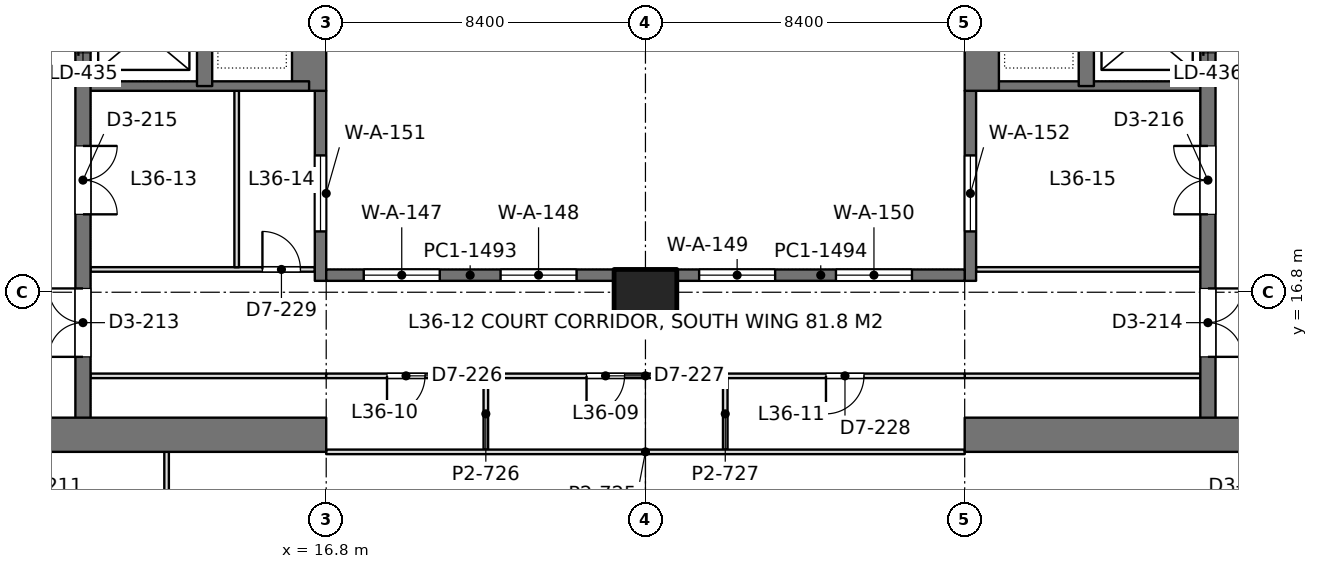
"""IFC4 building model, lengths in metres.
Left out: names, types, materials, properties, quantities, classifications, styles, units other than length and angle.
Written with IfcOpenShell. Run it as: python <this file> out.ifc"""

import sys

from ifc_helpers import new_model, si_unit, direction, frame, frame_2d, origin, origin_2d, place, context, subcontext, project, spatial, rectangle, extrude, element, fill, save


model = new_model("IFC4")
c1 = context("Model", 3, precision=1e-05, world=origin(), true_north=direction((0.0, 1.0)))
c2 = subcontext(c1, "Body", "Model", "MODEL_VIEW")
j1 = project(units=[si_unit("LENGTHUNIT", "METRE"), si_unit("PLANEANGLEUNIT", "RADIAN")], contexts=[c1])
p1 = place(None, origin())
s1 = spatial("IfcSite", under=j1, at=p1, CompositionType="ELEMENT")
p2 = place(p1, origin())
s2 = spatial("IfcBuilding", under=s1, at=p2, CompositionType="ELEMENT")
p3 = place(p2, frame((0.0, 0.0, 159.6)))
s3 = spatial("IfcBuildingStorey", under=s2, at=p3, CompositionType="ELEMENT", Elevation=159.6)
p4 = place(p3, frame((25.2, 16.8, 0.0), z_axis=(0.0, 0.0, 1.0), x_axis=(1.0, 0.0, 0.0)))
e1 = element("IfcColumn", 1, at=p4, inside=s3, PredefinedType="COLUMN", context=c2, shape_type="SweptSolid", body=[
    extrude(rectangle(XDim=1.65, YDim=1.2, at=origin_2d()), origin(), (0.0, 0.0, 1.0), 4.2),
])
p5 = place(p3, frame((-1.2, 13.05, 0.0), z_axis=(0.0, 0.0, 1.0), x_axis=(1.0, 0.0, 0.0)))
e2 = element("IfcWall", 2, at=p5, inside=s3, PredefinedType="SHEAR", context=c2, shape_type="SweptSolid", body=[
    extrude(rectangle(XDim=18.0, YDim=0.9, at=frame_2d((9.0, 0.0))), origin(), (0.0, 0.0, 1.0), 4.2),
])
p6 = place(p5, frame((8.95, 0.0, 0.0)))
e3 = element("IfcOpeningElement", 3, at=p6, cuts=e2, PredefinedType="OPENING", context=c2, shape_type="SweptSolid", body=[
    extrude(rectangle(XDim=1.8, YDim=2.4, at=frame_2d((0.9, 1.2))), frame((0.0, 0.46, 0.0), z_axis=(0.0, -1.0, 0.0), x_axis=(1.0, 0.0, 0.0)), (0.0, 0.0, 1.0), 0.92),
])
p7 = place(p3, frame((16.35, 22.1, 0.0), z_axis=(0.0, 0.0, 1.0), x_axis=(0.0, 1.0, 0.0)))
e4 = element("IfcWall", 4, at=p7, inside=s3, PredefinedType="SHEAR", context=c2, shape_type="SweptSolid", body=[
    extrude(rectangle(XDim=15.25, YDim=0.9, at=frame_2d((7.625, 0.0))), origin(), (0.0, 0.0, 1.0), 4.2),
])
p8 = place(p3, frame((10.4, 13.05, 0.0), z_axis=(0.0, 0.0, 1.0), x_axis=(0.0, 1.0, 0.0)))
e5 = element("IfcWall", 5, at=p8, inside=s3, PredefinedType="SHEAR", context=c2, shape_type="SweptSolid", body=[
    extrude(rectangle(XDim=24.3, YDim=0.4, at=frame_2d((12.15, 0.0))), origin(), (0.0, 0.0, 1.0), 4.2),
])
p9 = place(p8, frame((10.05, 0.0, 0.0)))
e6 = element("IfcOpeningElement", 6, at=p9, cuts=e5, PredefinedType="OPENING", context=c2, shape_type="SweptSolid", body=[
    extrude(rectangle(XDim=1.1, YDim=2.2, at=frame_2d((0.55, 1.1))), frame((0.0, 0.21, 0.0), z_axis=(0.0, -1.0, 0.0), x_axis=(1.0, 0.0, 0.0)), (0.0, 0.0, 1.0), 0.42),
])
p10 = place(p8, frame((12.9, 0.0, 0.0)))
e7 = element("IfcOpeningElement", 7, at=p10, cuts=e5, PredefinedType="OPENING", context=c2, shape_type="SweptSolid", body=[
    extrude(rectangle(XDim=1.1, YDim=2.2, at=frame_2d((0.55, 1.1))), frame((0.0, 0.21, 0.0), z_axis=(0.0, -1.0, 0.0), x_axis=(1.0, 0.0, 0.0)), (0.0, 0.0, 1.0), 0.42),
])
p11 = place(p8, frame((21.45, 0.0, 0.0)))
e8 = element("IfcOpeningElement", 8, at=p11, cuts=e5, PredefinedType="OPENING", context=c2, shape_type="SweptSolid", body=[
    extrude(rectangle(XDim=1.1, YDim=2.2, at=frame_2d((0.55, 1.1))), frame((0.0, 0.21, 0.0), z_axis=(0.0, -1.0, 0.0), x_axis=(1.0, 0.0, 0.0)), (0.0, 0.0, 1.0), 0.42),
])
p12 = place(p8, frame((2.05, 0.0, 0.0)))
e9 = element("IfcOpeningElement", 9, at=p12, cuts=e5, PredefinedType="OPENING", context=c2, shape_type="SweptSolid", body=[
    extrude(rectangle(XDim=1.8, YDim=2.4, at=frame_2d((0.9, 1.2))), frame((0.0, 0.21, 0.0), z_axis=(0.0, -1.0, 0.0), x_axis=(1.0, 0.0, 0.0)), (0.0, 0.0, 1.0), 0.42),
])
p13 = place(p8, frame((5.8, 0.0, 0.0)))
e10 = element("IfcOpeningElement", 10, at=p13, cuts=e5, PredefinedType="OPENING", context=c2, shape_type="SweptSolid", body=[
    extrude(rectangle(XDim=1.8, YDim=2.4, at=frame_2d((0.9, 1.2))), frame((0.0, 0.21, 0.0), z_axis=(0.0, -1.0, 0.0), x_axis=(1.0, 0.0, 0.0)), (0.0, 0.0, 1.0), 0.42),
])
p14 = place(p3, frame((13.6, 22.225, 0.0), z_axis=(0.0, 0.0, 1.0), x_axis=(0.0, 1.0, 0.0)))
e11 = element("IfcWall", 11, at=p14, inside=s3, PredefinedType="SHEAR", context=c2, shape_type="SweptSolid", body=[
    extrude(rectangle(XDim=15.125, YDim=0.4, at=frame_2d((7.562, 0.0))), origin(), (0.0, 0.0, 1.0), 4.2),
])
p15 = place(p3, frame((10.4, 22.225, 0.0), z_axis=(0.0, 0.0, 1.0), x_axis=(1.0, 0.0, 0.0)))
e12 = element("IfcWall", 12, at=p15, inside=s3, PredefinedType="SHEAR", context=c2, shape_type="SweptSolid", body=[
    extrude(rectangle(XDim=5.95, YDim=0.25, at=frame_2d((2.975, 0.0))), origin(), (0.0, 0.0, 1.0), 4.2),
])
p16 = place(p3, frame((33.6, 13.05, 0.0), z_axis=(0.0, 0.0, 1.0), x_axis=(1.0, 0.0, 0.0)))
e13 = element("IfcWall", 13, at=p16, inside=s3, PredefinedType="SHEAR", context=c2, shape_type="SweptSolid", body=[
    extrude(rectangle(XDim=18.0, YDim=0.9, at=frame_2d((9.0, 0.0))), origin(), (0.0, 0.0, 1.0), 4.2),
])
p17 = place(p16, frame((7.25, 0.0, 0.0)))
e14 = element("IfcOpeningElement", 14, at=p17, cuts=e13, PredefinedType="OPENING", context=c2, shape_type="SweptSolid", body=[
    extrude(rectangle(XDim=1.8, YDim=2.4, at=frame_2d((0.9, 1.2))), frame((0.0, 0.46, 0.0), z_axis=(0.0, -1.0, 0.0), x_axis=(1.0, 0.0, 0.0)), (0.0, 0.0, 1.0), 0.92),
])
p18 = place(p3, frame((34.05, 22.1, 0.0), z_axis=(0.0, 0.0, 1.0), x_axis=(0.0, 1.0, 0.0)))
e15 = element("IfcWall", 15, at=p18, inside=s3, PredefinedType="SHEAR", context=c2, shape_type="SweptSolid", body=[
    extrude(rectangle(XDim=15.25, YDim=0.9, at=frame_2d((7.625, 0.0))), origin(), (0.0, 0.0, 1.0), 4.2),
])
p19 = place(p3, frame((40.0, 13.05, 0.0), z_axis=(0.0, 0.0, 1.0), x_axis=(0.0, 1.0, 0.0)))
e16 = element("IfcWall", 16, at=p19, inside=s3, PredefinedType="SHEAR", context=c2, shape_type="SweptSolid", body=[
    extrude(rectangle(XDim=24.3, YDim=0.4, at=frame_2d((12.15, 0.0))), origin(), (0.0, 0.0, 1.0), 4.2),
])
p20 = place(p19, frame((10.05, 0.0, 0.0)))
e17 = element("IfcOpeningElement", 17, at=p20, cuts=e16, PredefinedType="OPENING", context=c2, shape_type="SweptSolid", body=[
    extrude(rectangle(XDim=1.1, YDim=2.2, at=frame_2d((0.55, 1.1))), frame((0.0, 0.21, 0.0), z_axis=(0.0, -1.0, 0.0), x_axis=(1.0, 0.0, 0.0)), (0.0, 0.0, 1.0), 0.42),
])
p21 = place(p19, frame((12.9, 0.0, 0.0)))
e18 = element("IfcOpeningElement", 18, at=p21, cuts=e16, PredefinedType="OPENING", context=c2, shape_type="SweptSolid", body=[
    extrude(rectangle(XDim=1.1, YDim=2.2, at=frame_2d((0.55, 1.1))), frame((0.0, 0.21, 0.0), z_axis=(0.0, -1.0, 0.0), x_axis=(1.0, 0.0, 0.0)), (0.0, 0.0, 1.0), 0.42),
])
p22 = place(p19, frame((21.45, 0.0, 0.0)))
e19 = element("IfcOpeningElement", 19, at=p22, cuts=e16, PredefinedType="OPENING", context=c2, shape_type="SweptSolid", body=[
    extrude(rectangle(XDim=1.1, YDim=2.2, at=frame_2d((0.55, 1.1))), frame((0.0, 0.21, 0.0), z_axis=(0.0, -1.0, 0.0), x_axis=(1.0, 0.0, 0.0)), (0.0, 0.0, 1.0), 0.42),
])
p23 = place(p19, frame((2.05, 0.0, 0.0)))
e20 = element("IfcOpeningElement", 20, at=p23, cuts=e16, PredefinedType="OPENING", context=c2, shape_type="SweptSolid", body=[
    extrude(rectangle(XDim=1.8, YDim=2.4, at=frame_2d((0.9, 1.2))), frame((0.0, 0.21, 0.0), z_axis=(0.0, -1.0, 0.0), x_axis=(1.0, 0.0, 0.0)), (0.0, 0.0, 1.0), 0.42),
])
p24 = place(p19, frame((5.8, 0.0, 0.0)))
e21 = element("IfcOpeningElement", 21, at=p24, cuts=e16, PredefinedType="OPENING", context=c2, shape_type="SweptSolid", body=[
    extrude(rectangle(XDim=1.8, YDim=2.4, at=frame_2d((0.9, 1.2))), frame((0.0, 0.21, 0.0), z_axis=(0.0, -1.0, 0.0), x_axis=(1.0, 0.0, 0.0)), (0.0, 0.0, 1.0), 0.42),
])
p25 = place(p3, frame((36.8, 22.225, 0.0), z_axis=(0.0, 0.0, 1.0), x_axis=(0.0, 1.0, 0.0)))
e22 = element("IfcWall", 22, at=p25, inside=s3, PredefinedType="SHEAR", context=c2, shape_type="SweptSolid", body=[
    extrude(rectangle(XDim=15.125, YDim=0.4, at=frame_2d((7.562, 0.0))), origin(), (0.0, 0.0, 1.0), 4.2),
])
p26 = place(p3, frame((40.0, 22.225, 0.0), z_axis=(0.0, 0.0, 1.0), x_axis=(-1.0, 0.0, 0.0)))
e23 = element("IfcWall", 23, at=p26, inside=s3, PredefinedType="SHEAR", context=c2, shape_type="SweptSolid", body=[
    extrude(rectangle(XDim=5.95, YDim=0.25, at=frame_2d((2.975, 0.0))), origin(), (0.0, 0.0, 1.0), 4.2),
])
p27 = place(p3, frame((16.65, 17.1, 0.0), z_axis=(0.0, 0.0, 1.0), x_axis=(0.0, 1.0, 0.0)))
e24 = element("IfcWall", 24, at=p27, inside=s3, PredefinedType="SOLIDWALL", context=c2, shape_type="SweptSolid", body=[
    extrude(rectangle(XDim=5.0, YDim=0.3, at=frame_2d((2.5, 0.0))), origin(), (0.0, 0.0, 1.0), 4.05),
])
p28 = place(p27, frame((1.3, 0.0, 0.1)))
e25 = element("IfcOpeningElement", 25, at=p28, cuts=e24, PredefinedType="OPENING", context=c2, shape_type="SweptSolid", body=[
    extrude(rectangle(XDim=2.0, YDim=3.0, at=frame_2d((1.0, 1.5))), frame((0.0, 0.16, 0.0), z_axis=(0.0, -1.0, 0.0), x_axis=(1.0, 0.0, 0.0)), (0.0, 0.0, 1.0), 0.32),
])
p29 = place(p3, frame((33.75, 17.1, 0.0), z_axis=(0.0, 0.0, 1.0), x_axis=(0.0, 1.0, 0.0)))
e26 = element("IfcWall", 26, at=p29, inside=s3, PredefinedType="SOLIDWALL", context=c2, shape_type="SweptSolid", body=[
    extrude(rectangle(XDim=5.0, YDim=0.3, at=frame_2d((2.5, 0.0))), origin(), (0.0, 0.0, 1.0), 4.05),
])
p30 = place(p29, frame((1.3, 0.0, 0.1)))
e27 = element("IfcOpeningElement", 27, at=p30, cuts=e26, PredefinedType="OPENING", context=c2, shape_type="SweptSolid", body=[
    extrude(rectangle(XDim=2.0, YDim=3.0, at=frame_2d((1.0, 1.5))), frame((0.0, 0.16, 0.0), z_axis=(0.0, -1.0, 0.0), x_axis=(1.0, 0.0, 0.0)), (0.0, 0.0, 1.0), 0.32),
])
p31 = place(p3, frame((16.8, 17.25, 0.0), z_axis=(0.0, 0.0, 1.0), x_axis=(1.0, 0.0, 0.0)))
e28 = element("IfcWall", 28, at=p31, inside=s3, PredefinedType="SOLIDWALL", context=c2, shape_type="SweptSolid", body=[
    extrude(rectangle(XDim=7.575, YDim=0.3, at=frame_2d((3.788, 0.0))), origin(), (0.0, 0.0, 1.0), 4.05),
])
p32 = place(p31, frame((0.988, 0.0, 0.1)))
e29 = element("IfcOpeningElement", 29, at=p32, cuts=e28, PredefinedType="OPENING", context=c2, shape_type="SweptSolid", body=[
    extrude(rectangle(XDim=2.0, YDim=3.0, at=frame_2d((1.0, 1.5))), frame((0.0, 0.16, 0.0), z_axis=(0.0, -1.0, 0.0), x_axis=(1.0, 0.0, 0.0)), (0.0, 0.0, 1.0), 0.32),
])
p33 = place(p31, frame((4.587, 0.0, 0.1)))
e30 = element("IfcOpeningElement", 30, at=p33, cuts=e28, PredefinedType="OPENING", context=c2, shape_type="SweptSolid", body=[
    extrude(rectangle(XDim=2.0, YDim=3.0, at=frame_2d((1.0, 1.5))), frame((0.0, 0.16, 0.0), z_axis=(0.0, -1.0, 0.0), x_axis=(1.0, 0.0, 0.0)), (0.0, 0.0, 1.0), 0.32),
])
p34 = place(p3, frame((26.025, 17.25, 0.0), z_axis=(0.0, 0.0, 1.0), x_axis=(1.0, 0.0, 0.0)))
e31 = element("IfcWall", 31, at=p34, inside=s3, PredefinedType="SOLIDWALL", context=c2, shape_type="SweptSolid", body=[
    extrude(rectangle(XDim=7.575, YDim=0.3, at=frame_2d((3.788, 0.0))), origin(), (0.0, 0.0, 1.0), 4.05),
])
p35 = place(p34, frame((0.587, 0.0, 0.1)))
e32 = element("IfcOpeningElement", 32, at=p35, cuts=e31, PredefinedType="OPENING", context=c2, shape_type="SweptSolid", body=[
    extrude(rectangle(XDim=2.0, YDim=3.0, at=frame_2d((1.0, 1.5))), frame((0.0, 0.16, 0.0), z_axis=(0.0, -1.0, 0.0), x_axis=(1.0, 0.0, 0.0)), (0.0, 0.0, 1.0), 0.32),
])
p36 = place(p34, frame((4.188, 0.0, 0.1)))
e33 = element("IfcOpeningElement", 33, at=p36, cuts=e31, PredefinedType="OPENING", context=c2, shape_type="SweptSolid", body=[
    extrude(rectangle(XDim=2.0, YDim=3.0, at=frame_2d((1.0, 1.5))), frame((0.0, 0.16, 0.0), z_axis=(0.0, -1.0, 0.0), x_axis=(1.0, 0.0, 0.0)), (0.0, 0.0, 1.0), 0.32),
])
p37 = place(p3, frame((10.598, 17.4, 0.0), z_axis=(0.0, 0.0, 1.0), x_axis=(1.0, 0.0, 0.0)))
e34 = element("IfcWall", 34, at=p37, inside=s3, PredefinedType="PARTITIONING", context=c2, shape_type="SweptSolid", body=[
    extrude(rectangle(XDim=5.904, YDim=0.12, at=frame_2d((2.952, 0.0))), origin(), (0.0, 0.0, 1.0), 3.55),
])
p38 = place(p37, frame((4.524, 0.0, 0.0)))
e35 = element("IfcOpeningElement", 35, at=p38, cuts=e34, PredefinedType="OPENING", context=c2, shape_type="SweptSolid", body=[
    extrude(rectangle(XDim=1.0, YDim=2.4, at=frame_2d((0.5, 1.2))), frame((0.0, 0.07, 0.0), z_axis=(0.0, -1.0, 0.0), x_axis=(1.0, 0.0, 0.0)), (0.0, 0.0, 1.0), 0.14),
])
p39 = place(p3, frame((14.444, 17.458, 0.0), z_axis=(0.0, 0.0, 1.0), x_axis=(0.0, 1.0, 0.0)))
e36 = element("IfcWall", 36, at=p39, inside=s3, PredefinedType="PARTITIONING", context=c2, shape_type="SweptSolid", body=[
    extrude(rectangle(XDim=4.644, YDim=0.12, at=frame_2d((2.322, 0.0))), origin(), (0.0, 0.0, 1.0), 3.6),
])
p40 = place(p3, frame((33.898, 17.4, 0.0), z_axis=(0.0, 0.0, 1.0), x_axis=(1.0, 0.0, 0.0)))
e37 = element("IfcWall", 37, at=p40, inside=s3, PredefinedType="PARTITIONING", context=c2, shape_type="SweptSolid", body=[
    extrude(rectangle(XDim=5.904, YDim=0.12, at=frame_2d((2.952, 0.0))), origin(), (0.0, 0.0, 1.0), 3.55),
])
p41 = place(p3, frame((12.6, 1.898, 0.0), z_axis=(0.0, 0.0, 1.0), x_axis=(0.0, 1.0, 0.0)))
e38 = element("IfcWall", 38, at=p41, inside=s3, PredefinedType="PARTITIONING", context=c2, shape_type="SweptSolid", body=[
    extrude(rectangle(XDim=10.704, YDim=0.12, at=frame_2d((5.352, 0.0))), origin(), (0.0, 0.0, 1.0), 3.55),
])
for number, where, z_axis, x_axis in (
    (39, (10.598, 14.6, 0.0), (0.0, 0.0, 1.0), (1.0, 0.0, 0.0)),
    (40, (33.598, 14.6, 0.0), (0.0, 0.0, 1.0), (1.0, 0.0, 0.0)),
):
    element("IfcWall", number, at=place(p3, frame(where, z_axis=z_axis, x_axis=x_axis)), inside=s3, PredefinedType="PARTITIONING", context=c2, shape_type="SweptSolid", body=[
        extrude(rectangle(XDim=6.204, YDim=0.12, at=frame_2d((3.102, 0.0))), origin(), (0.0, 0.0, 1.0), 3.55),
    ])
for number, where, z_axis, x_axis in (
    (41, (21.0, 12.658, 0.0), (0.0, 0.0, 1.0), (0.0, 1.0, 0.0)),
    (42, (27.3, 12.658, 0.0), (0.0, 0.0, 1.0), (0.0, 1.0, 0.0)),
):
    element("IfcWall", number, at=place(p3, frame(where, z_axis=z_axis, x_axis=x_axis)), inside=s3, PredefinedType="PARTITIONING", context=c2, shape_type="SweptSolid", body=[
        extrude(rectangle(XDim=1.884, YDim=0.12, at=frame_2d((0.942, 0.0))), origin(), (0.0, 0.0, 1.0), 4.05),
    ])
p42 = place(p3, frame((16.798, 14.6, 0.0), z_axis=(0.0, 0.0, 1.0), x_axis=(1.0, 0.0, 0.0)))
e43 = element("IfcWall", 43, at=p42, inside=s3, PredefinedType="PARTITIONING", context=c2, shape_type="SweptSolid", body=[
    extrude(rectangle(XDim=16.804, YDim=0.12, at=frame_2d((8.402, 0.0))), origin(), (0.0, 0.0, 1.0), 3.55),
])
p43 = place(p42, frame((1.602, 0.0, 0.0)))
e44 = element("IfcOpeningElement", 44, at=p43, cuts=e43, PredefinedType="OPENING", context=c2, shape_type="SweptSolid", body=[
    extrude(rectangle(XDim=1.0, YDim=2.4, at=frame_2d((0.5, 1.2))), frame((0.0, 0.07, 0.0), z_axis=(0.0, -1.0, 0.0), x_axis=(1.0, 0.0, 0.0)), (0.0, 0.0, 1.0), 0.14),
])
p44 = place(p42, frame((6.852, 0.0, 0.0)))
e45 = element("IfcOpeningElement", 45, at=p44, cuts=e43, PredefinedType="OPENING", context=c2, shape_type="SweptSolid", body=[
    extrude(rectangle(XDim=1.0, YDim=2.4, at=frame_2d((0.5, 1.2))), frame((0.0, 0.07, 0.0), z_axis=(0.0, -1.0, 0.0), x_axis=(1.0, 0.0, 0.0)), (0.0, 0.0, 1.0), 0.14),
])
p45 = place(p42, frame((13.152, 0.0, 0.0)))
e46 = element("IfcOpeningElement", 46, at=p45, cuts=e43, PredefinedType="OPENING", context=c2, shape_type="SweptSolid", body=[
    extrude(rectangle(XDim=1.0, YDim=2.4, at=frame_2d((0.5, 1.2))), frame((0.0, 0.07, 0.0), z_axis=(0.0, -1.0, 0.0), x_axis=(1.0, 0.0, 0.0)), (0.0, 0.0, 1.0), 0.14),
])
p46 = place(p3, frame((16.8, 12.6, 0.0), z_axis=(0.0, 0.0, 1.0), x_axis=(1.0, 0.0, 0.0)))
e47 = element("IfcWall", 47, at=p46, inside=s3, PredefinedType="PARTITIONING", context=c2, shape_type="SweptSolid", body=[
    extrude(rectangle(XDim=16.8, YDim=0.12, at=frame_2d((8.4, 0.0))), origin(), (0.0, 0.0, 1.0), 3.55),
])
p47 = place(p28, origin())
e48 = element("IfcWindow", 48, at=p47, inside=s3, PartitioningType="SINGLE_PANEL", PredefinedType="WINDOW", context=c2, shape_type="SweptSolid", body=[
    extrude(rectangle(XDim=2.0, YDim=3.0, at=frame_2d((1.0, 1.5))), frame((0.0, 0.03, 0.0), z_axis=(0.0, -1.0, 0.0), x_axis=(1.0, 0.0, 0.0)), (0.0, 0.0, 1.0), 0.06),
])
fill(e25, e48)
p48 = place(p30, origin())
e49 = element("IfcWindow", 49, at=p48, inside=s3, PartitioningType="SINGLE_PANEL", PredefinedType="WINDOW", context=c2, shape_type="SweptSolid", body=[
    extrude(rectangle(XDim=2.0, YDim=3.0, at=frame_2d((1.0, 1.5))), frame((0.0, 0.03, 0.0), z_axis=(0.0, -1.0, 0.0), x_axis=(1.0, 0.0, 0.0)), (0.0, 0.0, 1.0), 0.06),
])
fill(e27, e49)
p49 = place(p32, origin())
e50 = element("IfcWindow", 50, at=p49, inside=s3, PartitioningType="SINGLE_PANEL", PredefinedType="WINDOW", context=c2, shape_type="SweptSolid", body=[
    extrude(rectangle(XDim=2.0, YDim=3.0, at=frame_2d((1.0, 1.5))), frame((0.0, 0.03, 0.0), z_axis=(0.0, -1.0, 0.0), x_axis=(1.0, 0.0, 0.0)), (0.0, 0.0, 1.0), 0.06),
])
fill(e29, e50)
p50 = place(p33, origin())
e51 = element("IfcWindow", 51, at=p50, inside=s3, PartitioningType="SINGLE_PANEL", PredefinedType="WINDOW", context=c2, shape_type="SweptSolid", body=[
    extrude(rectangle(XDim=2.0, YDim=3.0, at=frame_2d((1.0, 1.5))), frame((0.0, 0.03, 0.0), z_axis=(0.0, -1.0, 0.0), x_axis=(1.0, 0.0, 0.0)), (0.0, 0.0, 1.0), 0.06),
])
fill(e30, e51)
p51 = place(p35, origin())
e52 = element("IfcWindow", 52, at=p51, inside=s3, PartitioningType="SINGLE_PANEL", PredefinedType="WINDOW", context=c2, shape_type="SweptSolid", body=[
    extrude(rectangle(XDim=2.0, YDim=3.0, at=frame_2d((1.0, 1.5))), frame((0.0, 0.03, 0.0), z_axis=(0.0, -1.0, 0.0), x_axis=(1.0, 0.0, 0.0)), (0.0, 0.0, 1.0), 0.06),
])
fill(e32, e52)
p52 = place(p36, origin())
e53 = element("IfcWindow", 53, at=p52, inside=s3, PartitioningType="SINGLE_PANEL", PredefinedType="WINDOW", context=c2, shape_type="SweptSolid", body=[
    extrude(rectangle(XDim=2.0, YDim=3.0, at=frame_2d((1.0, 1.5))), frame((0.0, 0.03, 0.0), z_axis=(0.0, -1.0, 0.0), x_axis=(1.0, 0.0, 0.0)), (0.0, 0.0, 1.0), 0.06),
])
fill(e33, e53)
p53 = place(p12, origin())
e54 = element("IfcDoor", 54, at=p53, inside=s3, OperationType="DOUBLE_DOOR_SINGLE_SWING", PredefinedType="DOOR", context=c2, shape_type="SweptSolid", body=[
    extrude(rectangle(XDim=1.8, YDim=2.4, at=frame_2d((0.9, 1.2))), frame((0.0, 0.025, 0.0), z_axis=(0.0, -1.0, 0.0), x_axis=(1.0, 0.0, 0.0)), (0.0, 0.0, 1.0), 0.05),
])
fill(e9, e54)
p54 = place(p13, frame((1.8, 0.0, 0.0), z_axis=(0.0, 0.0, 1.0), x_axis=(-1.0, 0.0, 0.0)))
e55 = element("IfcDoor", 55, at=p54, inside=s3, OperationType="DOUBLE_DOOR_SINGLE_SWING", PredefinedType="DOOR", context=c2, shape_type="SweptSolid", body=[
    extrude(rectangle(XDim=1.8, YDim=2.4, at=frame_2d((0.9, 1.2))), frame((0.0, 0.025, 0.0), z_axis=(0.0, -1.0, 0.0), x_axis=(1.0, 0.0, 0.0)), (0.0, 0.0, 1.0), 0.05),
])
fill(e10, e55)
p55 = place(p23, frame((1.8, 0.0, 0.0), z_axis=(0.0, 0.0, 1.0), x_axis=(-1.0, 0.0, 0.0)))
e56 = element("IfcDoor", 56, at=p55, inside=s3, OperationType="DOUBLE_DOOR_SINGLE_SWING", PredefinedType="DOOR", context=c2, shape_type="SweptSolid", body=[
    extrude(rectangle(XDim=1.8, YDim=2.4, at=frame_2d((0.9, 1.2))), frame((0.0, 0.025, 0.0), z_axis=(0.0, -1.0, 0.0), x_axis=(1.0, 0.0, 0.0)), (0.0, 0.0, 1.0), 0.05),
])
fill(e20, e56)
p56 = place(p24, origin())
e57 = element("IfcDoor", 57, at=p56, inside=s3, OperationType="DOUBLE_DOOR_SINGLE_SWING", PredefinedType="DOOR", context=c2, shape_type="SweptSolid", body=[
    extrude(rectangle(XDim=1.8, YDim=2.4, at=frame_2d((0.9, 1.2))), frame((0.0, 0.025, 0.0), z_axis=(0.0, -1.0, 0.0), x_axis=(1.0, 0.0, 0.0)), (0.0, 0.0, 1.0), 0.05),
])
fill(e21, e57)
p57 = place(p38, origin())
e58 = element("IfcDoor", 58, at=p57, inside=s3, OperationType="SINGLE_SWING_LEFT", PredefinedType="DOOR", context=c2, shape_type="SweptSolid", body=[
    extrude(rectangle(XDim=1.0, YDim=2.4, at=frame_2d((0.5, 1.2))), frame((0.0, 0.025, 0.0), z_axis=(0.0, -1.0, 0.0), x_axis=(1.0, 0.0, 0.0)), (0.0, 0.0, 1.0), 0.05),
])
fill(e35, e58)
p58 = place(p43, frame((1.0, 0.0, 0.0), z_axis=(0.0, 0.0, 1.0), x_axis=(-1.0, 0.0, 0.0)))
e59 = element("IfcDoor", 59, at=p58, inside=s3, OperationType="SINGLE_SWING_RIGHT", PredefinedType="DOOR", context=c2, shape_type="SweptSolid", body=[
    extrude(rectangle(XDim=1.0, YDim=2.4, at=frame_2d((0.5, 1.2))), frame((0.0, 0.025, 0.0), z_axis=(0.0, -1.0, 0.0), x_axis=(1.0, 0.0, 0.0)), (0.0, 0.0, 1.0), 0.05),
])
fill(e44, e59)
p59 = place(p44, frame((1.0, 0.0, 0.0), z_axis=(0.0, 0.0, 1.0), x_axis=(-1.0, 0.0, 0.0)))
e60 = element("IfcDoor", 60, at=p59, inside=s3, OperationType="SINGLE_SWING_RIGHT", PredefinedType="DOOR", context=c2, shape_type="SweptSolid", body=[
    extrude(rectangle(XDim=1.0, YDim=2.4, at=frame_2d((0.5, 1.2))), frame((0.0, 0.025, 0.0), z_axis=(0.0, -1.0, 0.0), x_axis=(1.0, 0.0, 0.0)), (0.0, 0.0, 1.0), 0.05),
])
fill(e45, e60)
p60 = place(p45, frame((1.0, 0.0, 0.0), z_axis=(0.0, 0.0, 1.0), x_axis=(-1.0, 0.0, 0.0)))
e61 = element("IfcDoor", 61, at=p60, inside=s3, OperationType="SINGLE_SWING_RIGHT", PredefinedType="DOOR", context=c2, shape_type="SweptSolid", body=[
    extrude(rectangle(XDim=1.0, YDim=2.4, at=frame_2d((0.5, 1.2))), frame((0.0, 0.025, 0.0), z_axis=(0.0, -1.0, 0.0), x_axis=(1.0, 0.0, 0.0)), (0.0, 0.0, 1.0), 0.05),
])
fill(e46, e61)
save(model, sys.argv[1])
